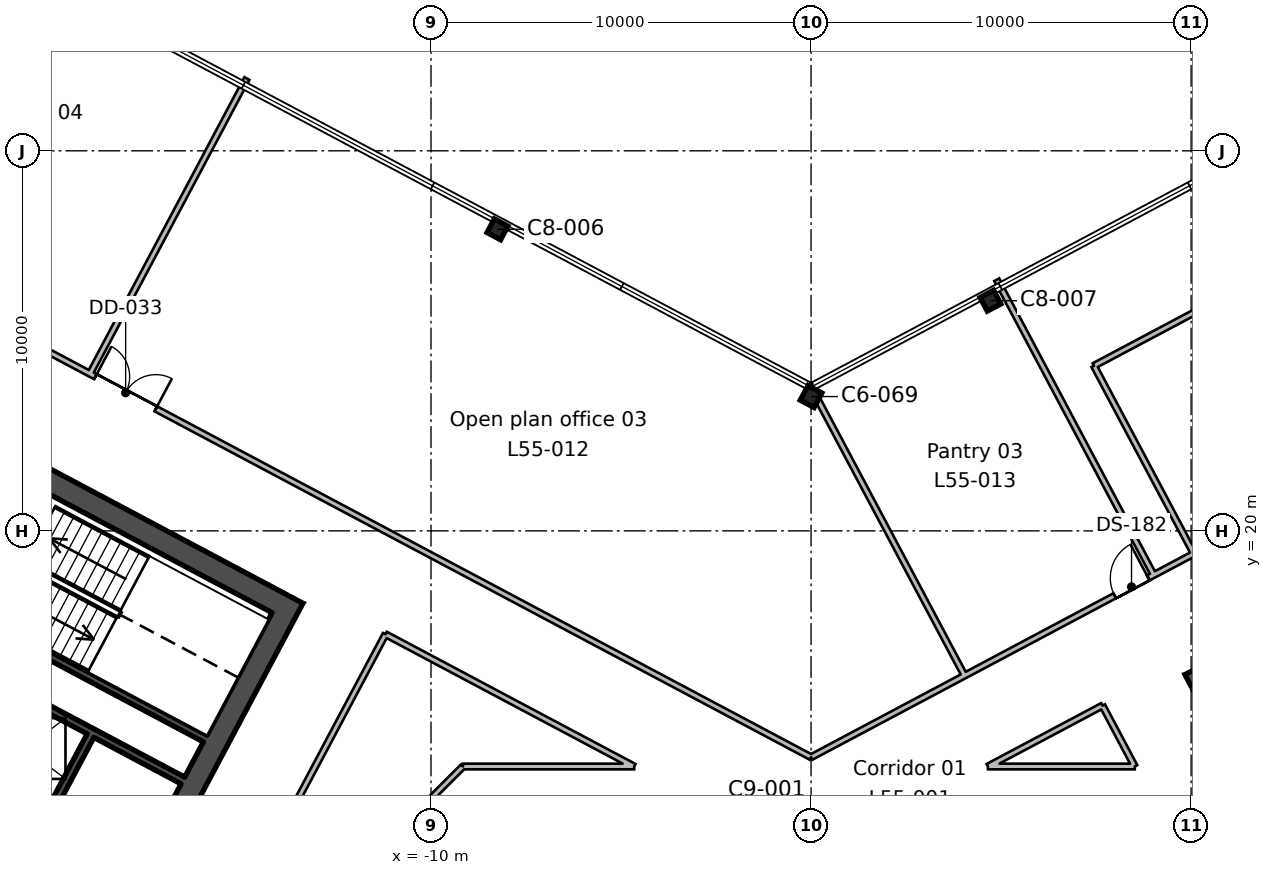
"""IFC4 building model, lengths in metres.
Left out: names, types, materials, properties, quantities, classifications, styles, units other than length and angle.
Written with IfcOpenShell. Run it as: python <this file> out.ifc"""

import sys

from ifc_helpers import new_model, si_unit, direction, frame, frame_2d, origin, origin_2d, place, context, subcontext, project, spatial, rectangle, i_section, extrude, element, fill, save


model = new_model("IFC4")
c1 = context("Model", 3, precision=1e-05, world=origin(), true_north=direction((0.0, 1.0)))
c2 = subcontext(c1, "Body", "Model", "MODEL_VIEW")
j1 = project(units=[si_unit("LENGTHUNIT", "METRE"), si_unit("PLANEANGLEUNIT", "RADIAN")], contexts=[c1])
p1 = place(None, origin())
s1 = spatial("IfcSite", under=j1, at=p1, CompositionType="ELEMENT")
p2 = place(p1, origin())
s2 = spatial("IfcBuilding", under=s1, at=p2, CompositionType="ELEMENT")
p3 = place(p2, frame((0.0, 0.0, 248.1)))
s3 = spatial("IfcBuildingStorey", under=s2, at=p3, CompositionType="ELEMENT", Elevation=248.1)
p4 = place(p3, frame((0.0, 23.534, 0.0), z_axis=(0.0, 0.0, 1.0), x_axis=(-0.882947592859, 0.469471562786, 0.0)))
e1 = element("IfcColumn", 1, at=p4, inside=s3, PredefinedType="COLUMN", context=c2, shape_type="SweptSolid", body=[
    extrude(i_section(OverallWidth=0.412, OverallDepth=0.434, WebThickness=0.036, FlangeThickness=0.057, FilletRadius=0.015, at=origin_2d()), origin(), (0.0, 0.0, 1.0), 3.9),
])
for number, where, z_axis, x_axis in (
    (2, (4.72, 26.056, 0.0), (0.0, 0.0, 1.0), (-0.883, -0.469, 0.0)),
    (3, (-8.252, 27.934, 0.0), (0.0, 0.0, 1.0), (-0.883, 0.469, 0.0)),
):
    element("IfcColumn", number, at=place(p3, frame(where, z_axis=z_axis, x_axis=x_axis)), inside=s3, PredefinedType="COLUMN", context=c2, shape_type="SweptSolid", body=[
        extrude(i_section(OverallWidth=0.404, OverallDepth=0.406, WebThickness=0.027, FlangeThickness=0.044, FilletRadius=0.015, at=origin_2d()), origin(), (0.0, 0.0, 1.0), 3.9),
    ])
p5 = place(p3, frame((-13.635, 18.236, 0.0), z_axis=(0.0, 0.0, 1.0), x_axis=(-0.469478769487, -0.88294376095, 0.0)))
e4 = element("IfcWall", 4, at=p5, inside=s3, PredefinedType="SHEAR", context=c2, shape_type="SweptSolid", body=[
    extrude(rectangle(XDim=19.4, YDim=0.6, at=frame_2d((9.7, 0.0))), origin(), (0.0, 0.0, 1.0), 3.9),
])
p6 = place(p5, frame((6.7, 0.0, 0.0)))
e5 = element("IfcOpeningElement", 5, at=p6, cuts=e4, PredefinedType="OPENING", context=c2, shape_type="SweptSolid", body=[
    extrude(rectangle(XDim=2.4, YDim=2.4, at=frame_2d((1.2, 1.2))), frame((0.0, 0.31, 0.0), z_axis=(0.0, -1.0, 0.0), x_axis=(1.0, 0.0, 0.0)), (0.0, 0.0, 1.0), 0.62),
])
p7 = place(p3, frame((-14.041, 18.112, 0.0), z_axis=(0.0, 0.0, 1.0), x_axis=(-0.882947755831, 0.46947125628, 0.0)))
e6 = element("IfcWall", 6, at=p7, inside=s3, PredefinedType="SHEAR", context=c2, shape_type="SweptSolid", body=[
    extrude(rectangle(XDim=20.2, YDim=0.6, at=frame_2d((10.1, 0.0))), origin(), (0.0, 0.0, 1.0), 3.9),
])
p8 = place(p3, frame((-18.96, 14.611, 0.0), z_axis=(0.0, 0.0, 1.0), x_axis=(-0.4694473164, -0.882960484464, 0.0)))
e7 = element("IfcWall", 7, at=p8, inside=s3, PredefinedType="SHEAR", context=c2, shape_type="SweptSolid", body=[
    extrude(rectangle(XDim=2.2, YDim=0.2, at=frame_2d((1.1, 0.0))), origin(), (0.0, 0.0, 1.0), 3.9),
])
p9 = place(p3, frame((-15.942, 14.536, 0.0), z_axis=(0.0, 0.0, 1.0), x_axis=(-0.882946947542, 0.469472776449, 0.0)))
e8 = element("IfcWall", 8, at=p9, inside=s3, PredefinedType="SHEAR", context=c2, shape_type="SweptSolid", body=[
    extrude(rectangle(XDim=8.0, YDim=0.2, at=frame_2d((4.0, 0.0))), origin(), (0.0, 0.0, 1.0), 3.9),
])
p10 = place(p3, frame((-16.529, 13.432, 0.0), z_axis=(0.0, 0.0, 1.0), x_axis=(-0.88295287151, 0.469461634952, 0.0)))
e9 = element("IfcWall", 9, at=p10, inside=s3, PredefinedType="SHEAR", context=c2, shape_type="SweptSolid", body=[
    extrude(rectangle(XDim=8.0, YDim=0.2, at=frame_2d((4.0, 0.0))), origin(), (0.0, 0.0, 1.0), 3.9),
])
p11 = place(p3, frame((-19.252, 8.311, 0.0), z_axis=(0.0, 0.0, 1.0), x_axis=(-0.882955722218, 0.469456273365, 0.0)))
e10 = element("IfcWall", 10, at=p11, inside=s3, PredefinedType="SHEAR", context=c2, shape_type="SweptSolid", body=[
    extrude(rectangle(XDim=10.0, YDim=0.2, at=frame_2d((5.0, 0.0))), origin(), (0.0, 0.0, 1.0), 3.9),
])
p12 = place(p11, frame((2.1, 0.0, 0.0)))
e11 = element("IfcOpeningElement", 11, at=p12, cuts=e10, PredefinedType="OPENING", context=c2, shape_type="SweptSolid", body=[
    extrude(rectangle(XDim=1.2, YDim=2.1, at=frame_2d((0.6, 1.05))), frame((0.0, 0.11, 0.0), z_axis=(0.0, -1.0, 0.0), x_axis=(1.0, 0.0, 0.0)), (0.0, 0.0, 1.0), 0.22),
])
p13 = place(p11, frame((6.85, 0.0, 0.0)))
e12 = element("IfcOpeningElement", 12, at=p13, cuts=e10, PredefinedType="OPENING", context=c2, shape_type="SweptSolid", body=[
    extrude(rectangle(XDim=0.9, YDim=2.1, at=frame_2d((0.45, 1.05))), frame((0.0, 0.11, 0.0), z_axis=(0.0, -1.0, 0.0), x_axis=(1.0, 0.0, 0.0)), (0.0, 0.0, 1.0), 0.22),
])
p14 = place(p3, frame((19.211, -0.771, 0.0), z_axis=(0.0, 0.0, 1.0), x_axis=(-0.469463742137, 0.882951751127, 0.0)))
e13 = element("IfcWall", 13, at=p14, inside=s3, PredefinedType="SHEAR", context=c2, shape_type="SweptSolid", body=[
    extrude(rectangle(XDim=19.4, YDim=0.6, at=frame_2d((9.7, 0.0))), origin(), (0.0, 0.0, 1.0), 3.9),
])
p15 = place(p14, frame((6.7, 0.0, 0.0)))
e14 = element("IfcOpeningElement", 14, at=p15, cuts=e13, PredefinedType="OPENING", context=c2, shape_type="SweptSolid", body=[
    extrude(rectangle(XDim=2.4, YDim=2.4, at=frame_2d((1.2, 1.2))), frame((0.0, 0.31, 0.0), z_axis=(0.0, -1.0, 0.0), x_axis=(1.0, 0.0, 0.0)), (0.0, 0.0, 1.0), 0.62),
])
p16 = place(p3, frame((-48.541, 39.854, 0.0), z_axis=(0.0, 0.0, 1.0), x_axis=(0.882945008423, -0.469476423372, 0.0)))
e15 = element("IfcWall", 15, at=p16, inside=s3, PredefinedType="PARTITIONING", context=c2, shape_type="SweptSolid", body=[
    extrude(rectangle(XDim=54.976, YDim=0.15, at=frame_2d((27.488, 0.0))), origin(), (0.0, 0.0, 1.0), 3.45),
])
p17 = place(p16, frame((33.65, 0.0, 0.0)))
e16 = element("IfcOpeningElement", 16, at=p17, cuts=e15, PredefinedType="OPENING", context=c2, shape_type="SweptSolid", body=[
    extrude(rectangle(XDim=1.8, YDim=2.1, at=frame_2d((0.9, 1.05))), frame((0.0, 0.085, 0.0), z_axis=(0.0, -1.0, 0.0), x_axis=(1.0, 0.0, 0.0)), (0.0, 0.0, 1.0), 0.17),
])
p18 = place(p16, frame((26.95, 0.0, 0.0)))
e17 = element("IfcOpeningElement", 17, at=p18, cuts=e15, PredefinedType="OPENING", context=c2, shape_type="SweptSolid", body=[
    extrude(rectangle(XDim=1.0, YDim=2.1, at=frame_2d((0.5, 1.05))), frame((0.0, 0.085, 0.0), z_axis=(0.0, -1.0, 0.0), x_axis=(1.0, 0.0, 0.0)), (0.0, 0.0, 1.0), 0.17),
])
p19 = place(p16, frame((21.05, 0.0, 0.0)))
e18 = element("IfcOpeningElement", 18, at=p19, cuts=e15, PredefinedType="OPENING", context=c2, shape_type="SweptSolid", body=[
    extrude(rectangle(XDim=1.0, YDim=2.1, at=frame_2d((0.5, 1.05))), frame((0.0, 0.085, 0.0), z_axis=(0.0, -1.0, 0.0), x_axis=(1.0, 0.0, 0.0)), (0.0, 0.0, 1.0), 0.17),
])
p20 = place(p16, frame((15.35, 0.0, 0.0)))
e19 = element("IfcOpeningElement", 19, at=p20, cuts=e15, PredefinedType="OPENING", context=c2, shape_type="SweptSolid", body=[
    extrude(rectangle(XDim=1.0, YDim=2.1, at=frame_2d((0.5, 1.05))), frame((0.0, 0.085, 0.0), z_axis=(0.0, -1.0, 0.0), x_axis=(1.0, 0.0, 0.0)), (0.0, 0.0, 1.0), 0.17),
])
p21 = place(p3, frame((0.0, 14.044, 0.0), z_axis=(0.0, 0.0, 1.0), x_axis=(0.882962129795, 0.469444221764, 0.0)))
e20 = element("IfcWall", 20, at=p21, inside=s3, PredefinedType="PARTITIONING", context=c2, shape_type="SweptSolid", body=[
    extrude(rectangle(XDim=41.607, YDim=0.15, at=frame_2d((20.803, 0.0))), origin(), (0.0, 0.0, 1.0), 3.45),
])
p22 = place(p21, frame((19.95, 0.0, 0.0)))
e21 = element("IfcOpeningElement", 21, at=p22, cuts=e20, PredefinedType="OPENING", context=c2, shape_type="SweptSolid", body=[
    extrude(rectangle(XDim=1.8, YDim=2.1, at=frame_2d((0.9, 1.05))), frame((0.0, 0.085, 0.0), z_axis=(0.0, -1.0, 0.0), x_axis=(1.0, 0.0, 0.0)), (0.0, 0.0, 1.0), 0.17),
])
p23 = place(p21, frame((9.05, 0.0, 0.0)))
e22 = element("IfcOpeningElement", 22, at=p23, cuts=e20, PredefinedType="OPENING", context=c2, shape_type="SweptSolid", body=[
    extrude(rectangle(XDim=1.0, YDim=2.1, at=frame_2d((0.5, 1.05))), frame((0.0, 0.085, 0.0), z_axis=(0.0, -1.0, 0.0), x_axis=(1.0, 0.0, 0.0)), (0.0, 0.0, 1.0), 0.17),
])
p24 = place(p3, frame((-14.844, 31.903, 0.0), z_axis=(0.0, 0.0, 1.0), x_axis=(-0.469359422187, -0.883007209939, 0.0)))
e23 = element("IfcWall", 23, at=p24, inside=s3, PredefinedType="PARTITIONING", context=c2, shape_type="SweptSolid", body=[
    extrude(rectangle(XDim=8.8, YDim=0.15, at=frame_2d((4.4, 0.0))), origin(), (0.0, 0.0, 1.0), 3.45),
])
p25 = place(p3, frame((0.183, 23.44, 0.0), z_axis=(0.0, 0.0, 1.0), x_axis=(0.469529135479, -0.882916978507, 0.0)))
e24 = element("IfcWall", 24, at=p25, inside=s3, PredefinedType="PARTITIONING", context=c2, shape_type="SweptSolid", body=[
    extrude(rectangle(XDim=8.21, YDim=0.15, at=frame_2d((4.105, 0.0))), origin(), (0.0, 0.0, 1.0), 3.45),
])
p26 = place(p3, frame((4.885, 26.608, 0.0), z_axis=(0.0, 0.0, 1.0), x_axis=(0.469445946219, -0.882961212952, 0.0)))
e25 = element("IfcWall", 25, at=p26, inside=s3, PredefinedType="PARTITIONING", context=c2, shape_type="SweptSolid", body=[
    extrude(rectangle(XDim=8.8, YDim=0.15, at=frame_2d((4.4, 0.0))), origin(), (0.0, 0.0, 1.0), 3.45),
])
p27 = place(p3, frame((10.072, 19.399, 0.0), z_axis=(0.0, 0.0, 1.0), x_axis=(-0.469483537511, 0.882941225681, 0.0)))
e26 = element("IfcWall", 26, at=p27, inside=s3, PredefinedType="PARTITIONING", context=c2, shape_type="SweptSolid", body=[
    extrude(rectangle(XDim=5.6, YDim=0.15, at=frame_2d((2.8, 0.0))), origin(), (0.0, 0.0, 1.0), 3.45),
])
p28 = place(p3, frame((7.443, 24.343, 0.0), z_axis=(0.0, 0.0, 1.0), x_axis=(0.882933890587, 0.469497332104, 0.0)))
e27 = element("IfcWall", 27, at=p28, inside=s3, PredefinedType="PARTITIONING", context=c2, shape_type="SweptSolid", body=[
    extrude(rectangle(XDim=15.721, YDim=0.15, at=frame_2d((7.861, 0.0))), origin(), (0.0, 0.0, 1.0), 3.45),
])
p29 = place(p3, frame((-20.588, -0.379, 0.0), z_axis=(0.0, 0.0, 1.0), x_axis=(0.469489882812, 0.882937851685, 0.0)))
e28 = element("IfcWall", 28, at=p29, inside=s3, PredefinedType="PARTITIONING", context=c2, shape_type="SweptSolid", body=[
    extrude(rectangle(XDim=20.0, YDim=0.15, at=frame_2d((10.0, 0.0))), origin(), (0.0, 0.0, 1.0), 3.45),
])
p30 = place(p29, frame((9.55, 0.0, 0.0)))
e29 = element("IfcOpeningElement", 29, at=p30, cuts=e28, PredefinedType="OPENING", context=c2, shape_type="SweptSolid", body=[
    extrude(rectangle(XDim=1.0, YDim=2.1, at=frame_2d((0.5, 1.05))), frame((0.0, 0.085, 0.0), z_axis=(0.0, -1.0, 0.0), x_axis=(1.0, 0.0, 0.0)), (0.0, 0.0, 1.0), 0.17),
])
p31 = place(p3, frame((-11.198, 17.28, 0.0), z_axis=(0.0, 0.0, 1.0), x_axis=(0.88294849999, -0.469469856717, 0.0)))
e30 = element("IfcWall", 30, at=p31, inside=s3, PredefinedType="PARTITIONING", context=c2, shape_type="SweptSolid", body=[
    extrude(rectangle(XDim=7.413, YDim=0.15, at=frame_2d((3.706, 0.0))), origin(), (0.0, 0.0, 1.0), 3.45),
])
p32 = place(p3, frame((-4.653, 13.8, 0.0), z_axis=(0.0, 0.0, 1.0), x_axis=(-1.0, 0.0, 0.0)))
e31 = element("IfcWall", 31, at=p32, inside=s3, PredefinedType="PARTITIONING", context=c2, shape_type="SweptSolid", body=[
    extrude(rectangle(XDim=4.507, YDim=0.15, at=frame_2d((2.253, 0.0))), origin(), (0.0, 0.0, 1.0), 3.45),
])
p33 = place(p3, frame((-9.16, 13.8, 0.0), z_axis=(0.0, 0.0, 1.0), x_axis=(-0.707106781187, -0.707106781187, 0.0)))
e32 = element("IfcWall", 32, at=p33, inside=s3, PredefinedType="PARTITIONING", context=c2, shape_type="SweptSolid", body=[
    extrude(rectangle(XDim=6.562, YDim=0.15, at=frame_2d((3.281, 0.0))), origin(), (0.0, 0.0, 1.0), 3.45),
])
p34 = place(p3, frame((4.653, 13.8, 0.0), z_axis=(0.0, 0.0, 1.0), x_axis=(1.0, 0.0, 0.0)))
e33 = element("IfcWall", 33, at=p34, inside=s3, PredefinedType="PARTITIONING", context=c2, shape_type="SweptSolid", body=[
    extrude(rectangle(XDim=3.865, YDim=0.15, at=frame_2d((1.933, 0.0))), origin(), (0.0, 0.0, 1.0), 3.45),
])
p35 = place(p3, frame((8.518, 13.8, 0.0), z_axis=(0.0, 0.0, 1.0), x_axis=(-0.469148666032, 0.883119204389, 0.0)))
e34 = element("IfcWall", 34, at=p35, inside=s3, PredefinedType="PARTITIONING", context=c2, shape_type="SweptSolid", body=[
    extrude(rectangle(XDim=1.814, YDim=0.15, at=frame_2d((0.907, 0.0))), origin(), (0.0, 0.0, 1.0), 3.45),
])
p36 = place(p3, frame((7.667, 15.402, 0.0), z_axis=(0.0, 0.0, 1.0), x_axis=(-0.883005489543, -0.469362658759, 0.0)))
e35 = element("IfcWall", 35, at=p36, inside=s3, PredefinedType="PARTITIONING", context=c2, shape_type="SweptSolid", body=[
    extrude(rectangle(XDim=3.413, YDim=0.15, at=frame_2d((1.707, 0.0))), origin(), (0.0, 0.0, 1.0), 3.45),
])
p37 = place(p23, origin())
e36 = element("IfcDoor", 36, at=p37, inside=s3, OperationType="SINGLE_SWING_RIGHT", PredefinedType="DOOR", context=c2, shape_type="SweptSolid", body=[
    extrude(rectangle(XDim=1.0, YDim=2.1, at=frame_2d((0.5, 1.05))), frame((0.0, 0.025, 0.0), z_axis=(0.0, -1.0, 0.0), x_axis=(1.0, 0.0, 0.0)), (0.0, 0.0, 1.0), 0.05),
])
fill(e22, e36)
p38 = place(p17, origin())
e37 = element("IfcDoor", 37, at=p38, inside=s3, OperationType="DOUBLE_DOOR_SINGLE_SWING", PredefinedType="DOOR", context=c2, shape_type="SweptSolid", body=[
    extrude(rectangle(XDim=1.8, YDim=2.1, at=frame_2d((0.9, 1.05))), frame((0.0, 0.025, 0.0), z_axis=(0.0, -1.0, 0.0), x_axis=(1.0, 0.0, 0.0)), (0.0, 0.0, 1.0), 0.05),
])
fill(e16, e37)
save(model, sys.argv[1])
